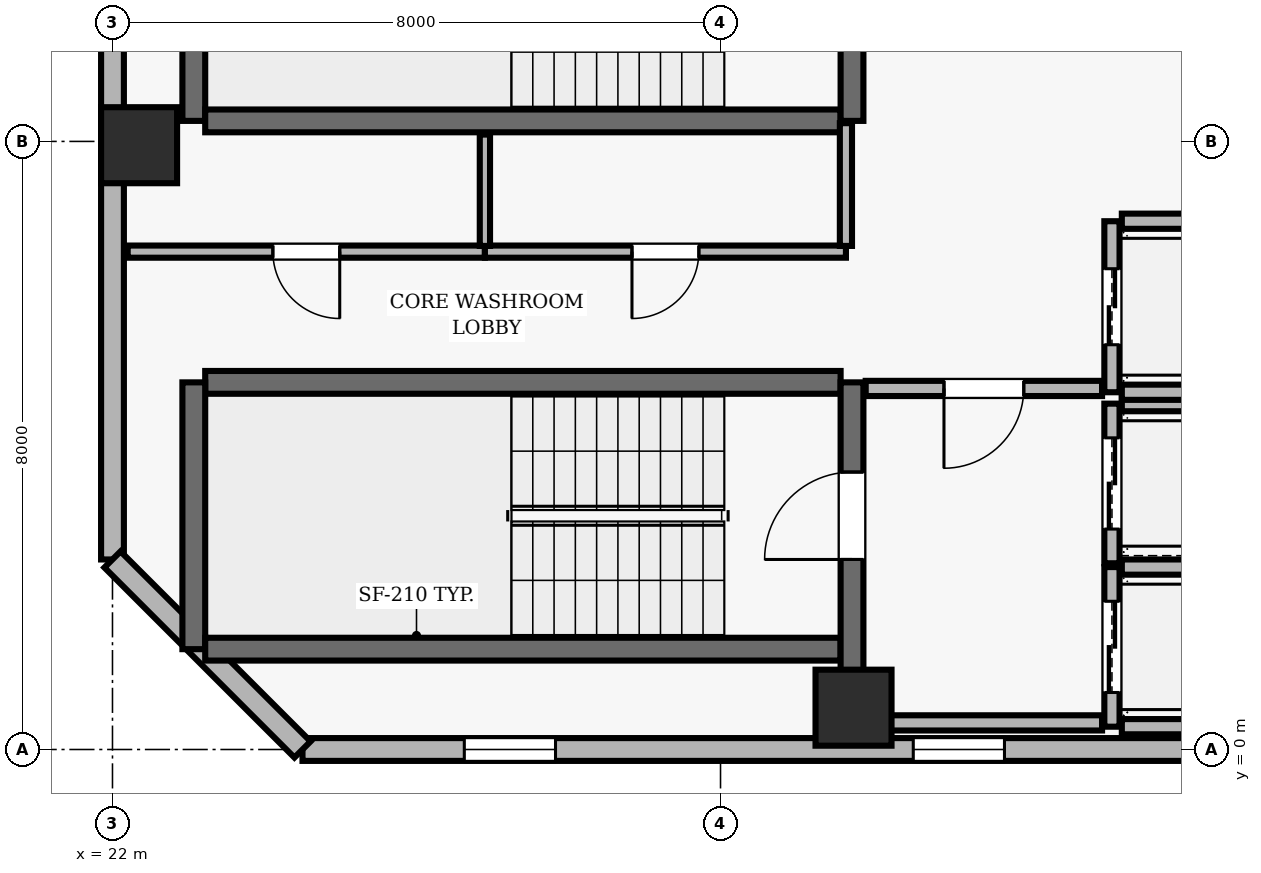
"""IFC4 building model, lengths in metres.
Left out: names, types, materials, properties, quantities, classifications, styles, units other than length and angle.
Written with IfcOpenShell. Run it as: python <this file> out.ifc"""

import sys

from ifc_helpers import new_model, si_unit, direction, frame, frame_2d, origin, origin_2d, place, context, subcontext, project, spatial, rectangle, extrude, element, fill, save


model = new_model("IFC4")
c1 = context("Model", 3, precision=1e-05, world=origin(), true_north=direction((0.0, 1.0)))
c2 = subcontext(c1, "Body", "Model", "MODEL_VIEW")
j1 = project(units=[si_unit("LENGTHUNIT", "METRE"), si_unit("PLANEANGLEUNIT", "RADIAN")], contexts=[c1])
p1 = place(None, origin())
s1 = spatial("IfcSite", under=j1, at=p1, CompositionType="ELEMENT")
p2 = place(p1, origin())
s2 = spatial("IfcBuilding", under=s1, at=p2, CompositionType="ELEMENT")
p3 = place(p2, frame((0.0, 0.0, 199.2)))
s3 = spatial("IfcBuildingStorey", under=s2, at=p3, CompositionType="ELEMENT", Elevation=199.2)
for number, where, z_axis, x_axis in (
    (1, (31.75, 0.55, 0.0), (0.0, 0.0, 1.0), (1.0, 0.0, 0.0)),
    (2, (22.35, 7.95, 0.0), (0.0, 0.0, 1.0), (1.0, 0.0, 0.0)),
):
    element("IfcColumn", number, at=place(p3, frame(where, z_axis=z_axis, x_axis=x_axis)), inside=s3, PredefinedType="COLUMN", context=c2, shape_type="SweptSolid", body=[
        extrude(rectangle(XDim=1.0, YDim=1.0, at=origin_2d()), origin(), (0.0, 0.0, 1.0), 3.9),
    ])
p4 = place(p3, frame((24.5, 0.0, 0.0), z_axis=(0.0, 0.0, 1.0), x_axis=(1.0, 0.0, 0.0)))
e3 = element("IfcWall", 3, at=p4, inside=s3, PredefinedType="SOLIDWALL", context=c2, shape_type="SweptSolid", body=[
    extrude(rectangle(XDim=38.2, YDim=0.3, at=frame_2d((19.1, 0.0))), origin(), (0.0, 0.0, 1.0), 3.69),
])
p5 = place(p4, frame((2.129, 0.0, 0.9)))
e4 = element("IfcOpeningElement", 4, at=p5, cuts=e3, PredefinedType="OPENING", context=c2, shape_type="SweptSolid", body=[
    extrude(rectangle(XDim=1.2, YDim=1.6, at=frame_2d((0.6, 0.8))), frame((0.0, 0.16, 0.0), z_axis=(0.0, -1.0, 0.0), x_axis=(1.0, 0.0, 0.0)), (0.0, 0.0, 1.0), 0.32),
])
p6 = place(p4, frame((8.036, 0.0, 0.9)))
e5 = element("IfcOpeningElement", 5, at=p6, cuts=e3, PredefinedType="OPENING", context=c2, shape_type="SweptSolid", body=[
    extrude(rectangle(XDim=1.2, YDim=1.6, at=frame_2d((0.6, 0.8))), frame((0.0, 0.16, 0.0), z_axis=(0.0, -1.0, 0.0), x_axis=(1.0, 0.0, 0.0)), (0.0, 0.0, 1.0), 0.32),
])
p7 = place(p4, frame((18.5, 0.0, 0.9)))
e6 = element("IfcOpeningElement", 6, at=p7, cuts=e3, PredefinedType="OPENING", context=c2, shape_type="SweptSolid", body=[
    extrude(rectangle(XDim=1.2, YDim=1.6, at=frame_2d((0.6, 0.8))), frame((0.0, 0.16, 0.0), z_axis=(0.0, -1.0, 0.0), x_axis=(1.0, 0.0, 0.0)), (0.0, 0.0, 1.0), 0.32),
])
p8 = place(p4, frame((23.957, 0.0, 0.9)))
e7 = element("IfcOpeningElement", 7, at=p8, cuts=e3, PredefinedType="OPENING", context=c2, shape_type="SweptSolid", body=[
    extrude(rectangle(XDim=1.2, YDim=1.6, at=frame_2d((0.6, 0.8))), frame((0.0, 0.16, 0.0), z_axis=(0.0, -1.0, 0.0), x_axis=(1.0, 0.0, 0.0)), (0.0, 0.0, 1.0), 0.32),
])
p9 = place(p4, frame((29.414, 0.0, 0.9)))
e8 = element("IfcOpeningElement", 8, at=p9, cuts=e3, PredefinedType="OPENING", context=c2, shape_type="SweptSolid", body=[
    extrude(rectangle(XDim=1.2, YDim=1.6, at=frame_2d((0.6, 0.8))), frame((0.0, 0.16, 0.0), z_axis=(0.0, -1.0, 0.0), x_axis=(1.0, 0.0, 0.0)), (0.0, 0.0, 1.0), 0.32),
])
p10 = place(p4, frame((35.771, 0.0, 0.9)))
e9 = element("IfcOpeningElement", 9, at=p10, cuts=e3, PredefinedType="OPENING", context=c2, shape_type="SweptSolid", body=[
    extrude(rectangle(XDim=1.2, YDim=1.6, at=frame_2d((0.6, 0.8))), frame((0.0, 0.16, 0.0), z_axis=(0.0, -1.0, 0.0), x_axis=(1.0, 0.0, 0.0)), (0.0, 0.0, 1.0), 0.32),
])
p11 = place(p3, frame((22.0, 40.7, 0.0), z_axis=(0.0, 0.0, 1.0), x_axis=(0.0, -1.0, 0.0)))
e10 = element("IfcWall", 10, at=p11, inside=s3, PredefinedType="SOLIDWALL", context=c2, shape_type="SweptSolid", body=[
    extrude(rectangle(XDim=38.2, YDim=0.3, at=frame_2d((19.1, 0.0))), origin(), (0.0, 0.0, 1.0), 3.69),
])
p12 = place(p11, frame((7.8, 0.0, 0.0)))
e11 = element("IfcOpeningElement", 11, at=p12, cuts=e10, PredefinedType="OPENING", context=c2, shape_type="SweptSolid", body=[
    extrude(rectangle(XDim=1.0, YDim=2.2, at=frame_2d((0.5, 1.1))), frame((0.0, 0.16, 0.0), z_axis=(0.0, -1.0, 0.0), x_axis=(1.0, 0.0, 0.0)), (0.0, 0.0, 1.0), 0.32),
])
p13 = place(p11, frame((2.129, 0.0, 0.9)))
e12 = element("IfcOpeningElement", 12, at=p13, cuts=e10, PredefinedType="OPENING", context=c2, shape_type="SweptSolid", body=[
    extrude(rectangle(XDim=1.2, YDim=1.6, at=frame_2d((0.6, 0.8))), frame((0.0, 0.16, 0.0), z_axis=(0.0, -1.0, 0.0), x_axis=(1.0, 0.0, 0.0)), (0.0, 0.0, 1.0), 0.32),
])
p14 = place(p11, frame((12.593, 0.0, 0.9)))
e13 = element("IfcOpeningElement", 13, at=p14, cuts=e10, PredefinedType="OPENING", context=c2, shape_type="SweptSolid", body=[
    extrude(rectangle(XDim=1.2, YDim=1.6, at=frame_2d((0.6, 0.8))), frame((0.0, 0.16, 0.0), z_axis=(0.0, -1.0, 0.0), x_axis=(1.0, 0.0, 0.0)), (0.0, 0.0, 1.0), 0.32),
])
p15 = place(p11, frame((18.5, 0.0, 0.9)))
e14 = element("IfcOpeningElement", 14, at=p15, cuts=e10, PredefinedType="OPENING", context=c2, shape_type="SweptSolid", body=[
    extrude(rectangle(XDim=1.2, YDim=1.6, at=frame_2d((0.6, 0.8))), frame((0.0, 0.16, 0.0), z_axis=(0.0, -1.0, 0.0), x_axis=(1.0, 0.0, 0.0)), (0.0, 0.0, 1.0), 0.32),
])
p16 = place(p11, frame((23.957, 0.0, 0.9)))
e15 = element("IfcOpeningElement", 15, at=p16, cuts=e10, PredefinedType="OPENING", context=c2, shape_type="SweptSolid", body=[
    extrude(rectangle(XDim=1.2, YDim=1.6, at=frame_2d((0.6, 0.8))), frame((0.0, 0.16, 0.0), z_axis=(0.0, -1.0, 0.0), x_axis=(1.0, 0.0, 0.0)), (0.0, 0.0, 1.0), 0.32),
])
p17 = place(p11, frame((29.414, 0.0, 0.9)))
e16 = element("IfcOpeningElement", 16, at=p17, cuts=e10, PredefinedType="OPENING", context=c2, shape_type="SweptSolid", body=[
    extrude(rectangle(XDim=1.2, YDim=1.6, at=frame_2d((0.6, 0.8))), frame((0.0, 0.16, 0.0), z_axis=(0.0, -1.0, 0.0), x_axis=(1.0, 0.0, 0.0)), (0.0, 0.0, 1.0), 0.32),
])
p18 = place(p3, frame((22.0, 2.5, 0.0), z_axis=(0.0, 0.0, 1.0), x_axis=(0.707106781187, -0.707106781187, 0.0)))
e17 = element("IfcWall", 17, at=p18, inside=s3, PredefinedType="SOLIDWALL", context=c2, shape_type="SweptSolid", body=[
    extrude(rectangle(XDim=3.536, YDim=0.3, at=frame_2d((1.768, 0.0))), origin(), (0.0, 0.0, 1.0), 3.69),
])
p19 = place(p3, frame((31.58, 4.83, 0.0), z_axis=(0.0, 0.0, 1.0), x_axis=(-1.0, 0.0, 0.0)))
e18 = element("IfcWall", 18, at=p19, inside=s3, PredefinedType="SHEAR", context=c2, shape_type="SweptSolid", body=[
    extrude(rectangle(XDim=8.36, YDim=0.3, at=frame_2d((4.18, 0.0))), origin(), (0.0, 0.0, 1.0), 3.69),
])
p20 = place(p3, frame((23.07, 4.83, 0.0), z_axis=(0.0, 0.0, 1.0), x_axis=(0.0, -1.0, 0.0)))
e19 = element("IfcWall", 19, at=p20, inside=s3, PredefinedType="SHEAR", context=c2, shape_type="SweptSolid", body=[
    extrude(rectangle(XDim=3.51, YDim=0.3, at=frame_2d((1.755, 0.0))), origin(), (0.0, 0.0, 1.0), 3.69),
])
p21 = place(p3, frame((23.22, 1.32, 0.0), z_axis=(0.0, 0.0, 1.0), x_axis=(1.0, 0.0, 0.0)))
e20 = element("IfcWall", 20, at=p21, inside=s3, PredefinedType="SHEAR", context=c2, shape_type="SweptSolid", body=[
    extrude(rectangle(XDim=8.36, YDim=0.3, at=frame_2d((4.18, 0.0))), origin(), (0.0, 0.0, 1.0), 3.69),
])
p22 = place(p3, frame((31.73, 0.96, 0.0), z_axis=(0.0, 0.0, 1.0), x_axis=(0.0, 1.0, 0.0)))
e21 = element("IfcWall", 21, at=p22, inside=s3, PredefinedType="SHEAR", context=c2, shape_type="SweptSolid", body=[
    extrude(rectangle(XDim=3.87, YDim=0.3, at=frame_2d((1.935, 0.0))), origin(), (0.0, 0.0, 1.0), 3.69),
])
p23 = place(p22, frame((1.54, 0.0, 0.0)))
e22 = element("IfcOpeningElement", 22, at=p23, cuts=e21, PredefinedType="OPENING", context=c2, shape_type="SweptSolid", body=[
    extrude(rectangle(XDim=1.15, YDim=2.15, at=frame_2d((0.575, 1.075))), frame((0.0, 0.16, 0.0), z_axis=(0.0, -1.0, 0.0), x_axis=(1.0, 0.0, 0.0)), (0.0, 0.0, 1.0), 0.32),
])
p24 = place(p3, frame((23.07, 11.78, 0.0), z_axis=(0.0, 0.0, 1.0), x_axis=(0.0, -1.0, 0.0)))
e23 = element("IfcWall", 23, at=p24, inside=s3, PredefinedType="SHEAR", context=c2, shape_type="SweptSolid", body=[
    extrude(rectangle(XDim=3.51, YDim=0.3, at=frame_2d((1.755, 0.0))), origin(), (0.0, 0.0, 1.0), 3.69),
])
p25 = place(p3, frame((23.22, 8.27, 0.0), z_axis=(0.0, 0.0, 1.0), x_axis=(1.0, 0.0, 0.0)))
e24 = element("IfcWall", 24, at=p25, inside=s3, PredefinedType="SHEAR", context=c2, shape_type="SweptSolid", body=[
    extrude(rectangle(XDim=8.36, YDim=0.3, at=frame_2d((4.18, 0.0))), origin(), (0.0, 0.0, 1.0), 3.69),
])
p26 = place(p3, frame((31.73, 8.27, 0.0), z_axis=(0.0, 0.0, 1.0), x_axis=(0.0, 1.0, 0.0)))
e25 = element("IfcWall", 25, at=p26, inside=s3, PredefinedType="SHEAR", context=c2, shape_type="SweptSolid", body=[
    extrude(rectangle(XDim=3.51, YDim=0.3, at=frame_2d((1.755, 0.0))), origin(), (0.0, 0.0, 1.0), 3.69),
])
p27 = place(p26, frame((1.18, 0.0, 0.0)))
e26 = element("IfcOpeningElement", 26, at=p27, cuts=e25, PredefinedType="OPENING", context=c2, shape_type="SweptSolid", body=[
    extrude(rectangle(XDim=1.15, YDim=2.15, at=frame_2d((0.575, 1.075))), frame((0.0, 0.16, 0.0), z_axis=(0.0, -1.0, 0.0), x_axis=(1.0, 0.0, 0.0)), (0.0, 0.0, 1.0), 0.32),
])
p28 = place(p3, frame((35.15, 2.4, 0.0), z_axis=(0.0, 0.0, 1.0), x_axis=(0.0, -1.0, 0.0)))
e27 = element("IfcWall", 27, at=p28, inside=s3, PredefinedType="SOLIDWALL", context=c2, shape_type="SweptSolid", body=[
    extrude(rectangle(XDim=2.1, YDim=0.2, at=frame_2d((1.05, 0.0))), origin(), (0.0, 0.0, 1.0), 3.69),
])
p29 = place(p28, frame((0.45, 0.0, 0.0)))
e28 = element("IfcOpeningElement", 28, at=p29, cuts=e27, PredefinedType="OPENING", context=c2, shape_type="SweptSolid", body=[
    extrude(rectangle(XDim=1.2, YDim=2.15, at=frame_2d((0.6, 1.075))), frame((0.0, 0.11, 0.0), z_axis=(0.0, -1.0, 0.0), x_axis=(1.0, 0.0, 0.0)), (0.0, 0.0, 1.0), 0.22),
])
for number, where, z_axis, x_axis in (
    (29, (35.28, 0.3, 0.0), (0.0, 0.0, 1.0), (1.0, 0.0, 0.0)),
    (30, (37.42, 2.4, 0.0), (0.0, 0.0, 1.0), (-1.0, 0.0, 0.0)),
):
    element("IfcWall", number, at=place(p3, frame(where, z_axis=z_axis, x_axis=x_axis)), inside=s3, PredefinedType="SOLIDWALL", context=c2, shape_type="SweptSolid", body=[
        extrude(rectangle(XDim=2.14, YDim=0.2, at=frame_2d((1.07, 0.0))), origin(), (0.0, 0.0, 1.0), 3.69),
    ])
p30 = place(p3, frame((35.15, 4.55, 0.0), z_axis=(0.0, 0.0, 1.0), x_axis=(0.0, -1.0, 0.0)))
e31 = element("IfcWall", 31, at=p30, inside=s3, PredefinedType="SOLIDWALL", context=c2, shape_type="SweptSolid", body=[
    extrude(rectangle(XDim=2.1, YDim=0.2, at=frame_2d((1.05, 0.0))), origin(), (0.0, 0.0, 1.0), 3.69),
])
p31 = place(p30, frame((0.45, 0.0, 0.0)))
e32 = element("IfcOpeningElement", 32, at=p31, cuts=e31, PredefinedType="OPENING", context=c2, shape_type="SweptSolid", body=[
    extrude(rectangle(XDim=1.2, YDim=2.15, at=frame_2d((0.6, 1.075))), frame((0.0, 0.11, 0.0), z_axis=(0.0, -1.0, 0.0), x_axis=(1.0, 0.0, 0.0)), (0.0, 0.0, 1.0), 0.22),
])
p32 = place(p3, frame((37.42, 4.55, 0.0), z_axis=(0.0, 0.0, 1.0), x_axis=(-1.0, 0.0, 0.0)))
e33 = element("IfcWall", 33, at=p32, inside=s3, PredefinedType="SOLIDWALL", context=c2, shape_type="SweptSolid", body=[
    extrude(rectangle(XDim=2.14, YDim=0.2, at=frame_2d((1.07, 0.0))), origin(), (0.0, 0.0, 1.0), 3.69),
])
p33 = place(p3, frame((35.15, 6.95, 0.0), z_axis=(0.0, 0.0, 1.0), x_axis=(0.0, -1.0, 0.0)))
e34 = element("IfcWall", 34, at=p33, inside=s3, PredefinedType="SOLIDWALL", context=c2, shape_type="SweptSolid", body=[
    extrude(rectangle(XDim=2.25, YDim=0.2, at=frame_2d((1.125, 0.0))), origin(), (0.0, 0.0, 1.0), 3.69),
])
p34 = place(p33, frame((0.625, 0.0, 0.0)))
e35 = element("IfcOpeningElement", 35, at=p34, cuts=e34, PredefinedType="OPENING", context=c2, shape_type="SweptSolid", body=[
    extrude(rectangle(XDim=1.0, YDim=2.1, at=frame_2d((0.5, 1.05))), frame((0.0, 0.11, 0.0), z_axis=(0.0, -1.0, 0.0), x_axis=(1.0, 0.0, 0.0)), (0.0, 0.0, 1.0), 0.22),
])
for number, where, z_axis, x_axis in (
    (36, (35.28, 4.7, 0.0), (0.0, 0.0, 1.0), (1.0, 0.0, 0.0)),
    (37, (37.42, 6.95, 0.0), (0.0, 0.0, 1.0), (-1.0, 0.0, 0.0)),
):
    element("IfcWall", number, at=place(p3, frame(where, z_axis=z_axis, x_axis=x_axis)), inside=s3, PredefinedType="SOLIDWALL", context=c2, shape_type="SweptSolid", body=[
        extrude(rectangle(XDim=2.14, YDim=0.2, at=frame_2d((1.07, 0.0))), origin(), (0.0, 0.0, 1.0), 3.69),
    ])
p35 = place(p3, frame((26.9, 6.55, 0.0), z_axis=(0.0, 0.0, 1.0), x_axis=(-1.0, 0.0, 0.0)))
e38 = element("IfcWall", 38, at=p35, inside=s3, PredefinedType="PARTITIONING", context=c2, shape_type="SweptSolid", body=[
    extrude(rectangle(XDim=4.7, YDim=0.16, at=frame_2d((2.35, 0.0))), origin(), (0.0, 0.0, 1.0), 3.69),
])
p36 = place(p35, frame((1.91, 0.0, 0.0)))
e39 = element("IfcOpeningElement", 39, at=p36, cuts=e38, PredefinedType="OPENING", context=c2, shape_type="SweptSolid", body=[
    extrude(rectangle(XDim=0.88, YDim=2.1, at=frame_2d((0.44, 1.05))), frame((0.0, 0.09, 0.0), z_axis=(0.0, -1.0, 0.0), x_axis=(1.0, 0.0, 0.0)), (0.0, 0.0, 1.0), 0.18),
])
p37 = place(p3, frame((31.65, 0.35, 0.0), z_axis=(0.0, 0.0, 1.0), x_axis=(1.0, 0.0, 0.0)))
e40 = element("IfcWall", 40, at=p37, inside=s3, PredefinedType="SOLIDWALL", context=c2, shape_type="SweptSolid", body=[
    extrude(rectangle(XDim=3.37, YDim=0.2, at=frame_2d((1.685, 0.0))), origin(), (0.0, 0.0, 1.0), 3.69),
])
p38 = place(p3, frame((31.65, 6.55, 0.0), z_axis=(0.0, 0.0, 1.0), x_axis=(-1.0, 0.0, 0.0)))
e41 = element("IfcWall", 41, at=p38, inside=s3, PredefinedType="PARTITIONING", context=c2, shape_type="SweptSolid", body=[
    extrude(rectangle(XDim=4.75, YDim=0.16, at=frame_2d((2.375, 0.0))), origin(), (0.0, 0.0, 1.0), 3.69),
])
p39 = place(p38, frame((1.935, 0.0, 0.0)))
e42 = element("IfcOpeningElement", 42, at=p39, cuts=e41, PredefinedType="OPENING", context=c2, shape_type="SweptSolid", body=[
    extrude(rectangle(XDim=0.88, YDim=2.1, at=frame_2d((0.44, 1.05))), frame((0.0, 0.09, 0.0), z_axis=(0.0, -1.0, 0.0), x_axis=(1.0, 0.0, 0.0)), (0.0, 0.0, 1.0), 0.18),
])
p40 = place(p3, frame((35.02, 4.75, 0.0), z_axis=(0.0, 0.0, 1.0), x_axis=(-1.0, 0.0, 0.0)))
e43 = element("IfcWall", 43, at=p40, inside=s3, PredefinedType="SOLIDWALL", context=c2, shape_type="SweptSolid", body=[
    extrude(rectangle(XDim=3.11, YDim=0.2, at=frame_2d((1.555, 0.0))), origin(), (0.0, 0.0, 1.0), 3.69),
])
p41 = place(p40, frame((1.03, 0.0, 0.0)))
e44 = element("IfcOpeningElement", 44, at=p41, cuts=e43, PredefinedType="OPENING", context=c2, shape_type="SweptSolid", body=[
    extrude(rectangle(XDim=1.05, YDim=2.15, at=frame_2d((0.525, 1.075))), frame((0.0, 0.11, 0.0), z_axis=(0.0, -1.0, 0.0), x_axis=(1.0, 0.0, 0.0)), (0.0, 0.0, 1.0), 0.22),
])
p42 = place(p3, frame((26.9, 6.625, 0.0), z_axis=(0.0, 0.0, 1.0), x_axis=(0.0, 1.0, 0.0)))
e45 = element("IfcWall", 45, at=p42, inside=s3, PredefinedType="PARTITIONING", context=c2, shape_type="SweptSolid", body=[
    extrude(rectangle(XDim=1.465, YDim=0.135, at=frame_2d((0.732, 0.0))), origin(), (0.0, 0.0, 1.0), 3.69),
])
p43 = place(p3, frame((31.65, 8.24, 0.0), z_axis=(0.0, 0.0, 1.0), x_axis=(0.0, -1.0, 0.0)))
e46 = element("IfcWall", 46, at=p43, inside=s3, PredefinedType="PARTITIONING", context=c2, shape_type="SweptSolid", body=[
    extrude(rectangle(XDim=1.615, YDim=0.16, at=frame_2d((0.808, 0.0))), origin(), (0.0, 0.0, 1.0), 3.69),
])
p44 = place(p5, origin())
e47 = element("IfcWindow", 47, at=p44, inside=s3, PartitioningType="SINGLE_PANEL", PredefinedType="WINDOW", context=c2, shape_type="SweptSolid", body=[
    extrude(rectangle(XDim=1.2, YDim=1.6, at=frame_2d((0.6, 0.8))), frame((0.0, 0.03, 0.0), z_axis=(0.0, -1.0, 0.0), x_axis=(1.0, 0.0, 0.0)), (0.0, 0.0, 1.0), 0.06),
])
fill(e4, e47)
p45 = place(p6, origin())
e48 = element("IfcWindow", 48, at=p45, inside=s3, PartitioningType="SINGLE_PANEL", PredefinedType="WINDOW", context=c2, shape_type="SweptSolid", body=[
    extrude(rectangle(XDim=1.2, YDim=1.6, at=frame_2d((0.6, 0.8))), frame((0.0, 0.03, 0.0), z_axis=(0.0, -1.0, 0.0), x_axis=(1.0, 0.0, 0.0)), (0.0, 0.0, 1.0), 0.06),
])
fill(e5, e48)
p46 = place(p23, origin())
e49 = element("IfcDoor", 49, at=p46, inside=s3, OperationType="SINGLE_SWING_LEFT", PredefinedType="DOOR", context=c2, shape_type="SweptSolid", body=[
    extrude(rectangle(XDim=1.15, YDim=2.15, at=frame_2d((0.575, 1.075))), frame((0.0, 0.025, 0.0), z_axis=(0.0, -1.0, 0.0), x_axis=(1.0, 0.0, 0.0)), (0.0, 0.0, 1.0), 0.05),
])
fill(e22, e49)
p47 = place(p29, origin())
e50 = element("IfcDoor", 50, at=p47, inside=s3, OperationType="DOUBLE_DOOR_SLIDING", PredefinedType="DOOR", context=c2, shape_type="SweptSolid", body=[
    extrude(rectangle(XDim=1.2, YDim=2.15, at=frame_2d((0.6, 1.075))), frame((0.0, 0.025, 0.0), z_axis=(0.0, -1.0, 0.0), x_axis=(1.0, 0.0, 0.0)), (0.0, 0.0, 1.0), 0.05),
])
fill(e28, e50)
p48 = place(p31, origin())
e51 = element("IfcDoor", 51, at=p48, inside=s3, OperationType="DOUBLE_DOOR_SLIDING", PredefinedType="DOOR", context=c2, shape_type="SweptSolid", body=[
    extrude(rectangle(XDim=1.2, YDim=2.15, at=frame_2d((0.6, 1.075))), frame((0.0, 0.025, 0.0), z_axis=(0.0, -1.0, 0.0), x_axis=(1.0, 0.0, 0.0)), (0.0, 0.0, 1.0), 0.05),
])
fill(e32, e51)
p49 = place(p34, origin())
e52 = element("IfcDoor", 52, at=p49, inside=s3, OperationType="DOUBLE_DOOR_SLIDING", PredefinedType="DOOR", context=c2, shape_type="SweptSolid", body=[
    extrude(rectangle(XDim=1.0, YDim=2.1, at=frame_2d((0.5, 1.05))), frame((0.0, 0.025, 0.0), z_axis=(0.0, -1.0, 0.0), x_axis=(1.0, 0.0, 0.0)), (0.0, 0.0, 1.0), 0.05),
])
fill(e35, e52)
p50 = place(p41, origin())
e53 = element("IfcDoor", 53, at=p50, inside=s3, OperationType="SINGLE_SWING_RIGHT", PredefinedType="DOOR", context=c2, shape_type="SweptSolid", body=[
    extrude(rectangle(XDim=1.05, YDim=2.15, at=frame_2d((0.525, 1.075))), frame((0.0, 0.025, 0.0), z_axis=(0.0, -1.0, 0.0), x_axis=(1.0, 0.0, 0.0)), (0.0, 0.0, 1.0), 0.05),
])
fill(e44, e53)
p51 = place(p36, origin())
e54 = element("IfcDoor", 54, at=p51, inside=s3, OperationType="SINGLE_SWING_LEFT", PredefinedType="DOOR", context=c2, shape_type="SweptSolid", body=[
    extrude(rectangle(XDim=0.88, YDim=2.1, at=frame_2d((0.44, 1.05))), frame((0.0, 0.025, 0.0), z_axis=(0.0, -1.0, 0.0), x_axis=(1.0, 0.0, 0.0)), (0.0, 0.0, 1.0), 0.05),
])
fill(e39, e54)
p52 = place(p39, origin())
e55 = element("IfcDoor", 55, at=p52, inside=s3, OperationType="SINGLE_SWING_RIGHT", PredefinedType="DOOR", context=c2, shape_type="SweptSolid", body=[
    extrude(rectangle(XDim=0.88, YDim=2.1, at=frame_2d((0.44, 1.05))), frame((0.0, 0.025, 0.0), z_axis=(0.0, -1.0, 0.0), x_axis=(1.0, 0.0, 0.0)), (0.0, 0.0, 1.0), 0.05),
])
fill(e42, e55)
save(model, sys.argv[1])
